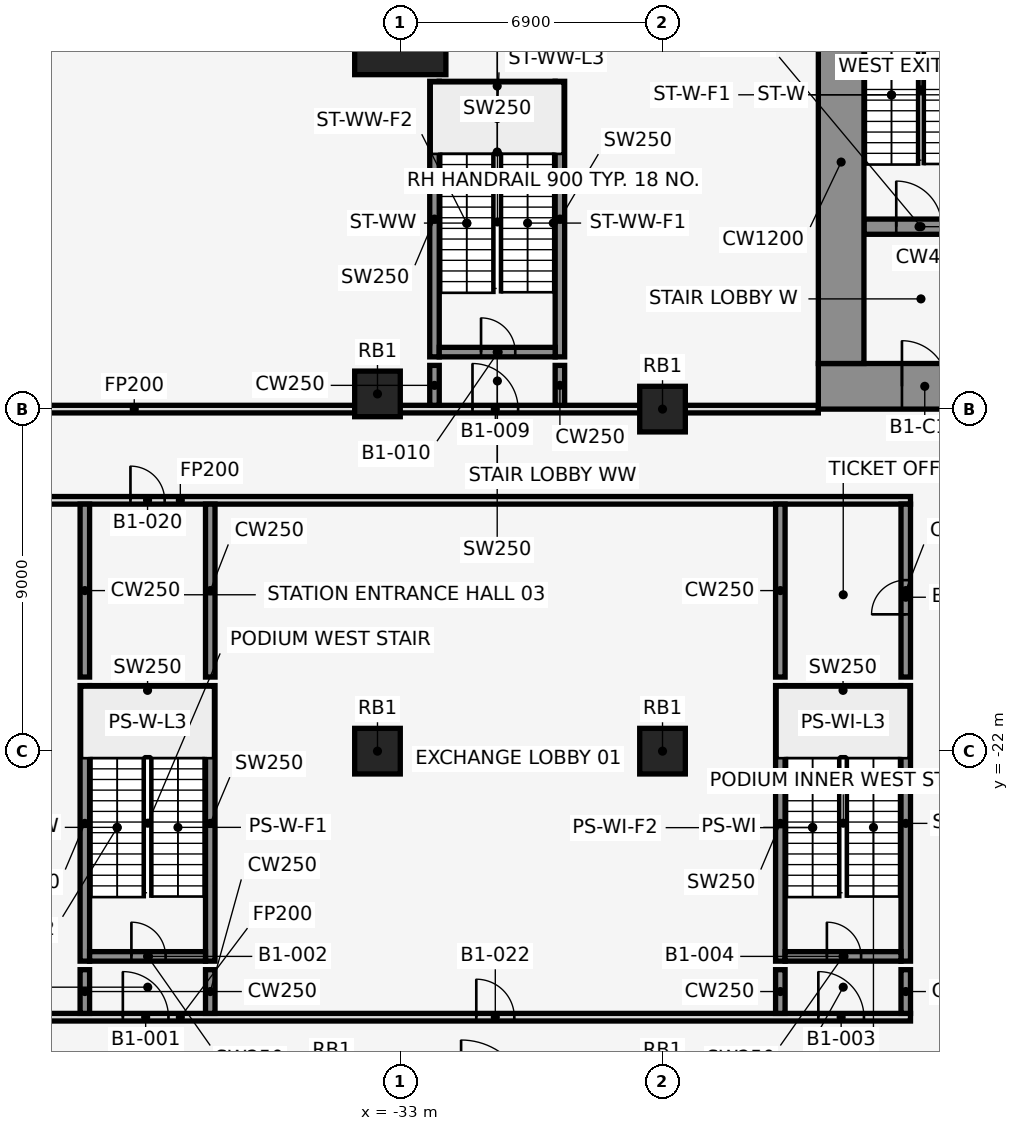
"""IFC4 building model, lengths in metres.
Left out: names, types, materials, properties, quantities, classifications, styles, units other than length and angle.
Written with IfcOpenShell. Run it as: python <this file> out.ifc"""

import sys

from ifc_helpers import new_model, si_unit, direction, frame, frame_2d, origin, origin_2d, place, context, subcontext, project, spatial, rectangle, extrude, element, fill, save


model = new_model("IFC4")
c1 = context("Model", 3, precision=1e-05, world=origin(), true_north=direction((0.0, 1.0)))
c2 = subcontext(c1, "Body", "Model", "MODEL_VIEW")
j1 = project(units=[si_unit("LENGTHUNIT", "METRE"), si_unit("PLANEANGLEUNIT", "RADIAN")], contexts=[c1])
p1 = place(None, origin())
s1 = spatial("IfcSite", under=j1, at=p1, CompositionType="ELEMENT")
p2 = place(p1, origin())
s2 = spatial("IfcBuilding", under=s1, at=p2, CompositionType="ELEMENT")
p3 = place(p2, frame((0.0, 0.0, -5.0)))
s3 = spatial("IfcBuildingStorey", under=s2, at=p3, CompositionType="ELEMENT", Elevation=-5.0)
p4 = place(p3, frame((-33.0, -3.0, 0.0), z_axis=(0.0, 0.0, 1.0), x_axis=(1.0, 0.0, 0.0)))
e1 = element("IfcColumn", 1, at=p4, inside=s3, PredefinedType="COLUMN", context=c2, shape_type="SweptSolid", body=[
    extrude(rectangle(XDim=2.4, YDim=2.4, at=origin_2d()), origin(), (0.0, 0.0, 1.0), 5.0),
])
for number, where, z_axis, x_axis in (
    (2, (-33.6, -12.6, 0.0), (0.0, 0.0, 1.0), (1.0, 0.0, 0.0)),
    (3, (-33.6, -22.0, 0.0), (0.0, 0.0, 1.0), (1.0, 0.0, 0.0)),
    (4, (-26.1, -22.0, 0.0), (0.0, 0.0, 1.0), (1.0, 0.0, 0.0)),
    (5, (-26.1, -13.0, 0.0), (0.0, 0.0, 1.0), (1.0, 0.0, 0.0)),
):
    element("IfcColumn", number, at=place(p3, frame(where, z_axis=z_axis, x_axis=x_axis)), inside=s3, PredefinedType="COLUMN", context=c2, shape_type="SweptSolid", body=[
        extrude(rectangle(XDim=1.2, YDim=1.2, at=origin_2d()), origin(), (0.0, 0.0, 1.0), 5.0),
    ])
for number, where, z_axis, x_axis in (
    (6, (-32.1, -11.625, 0.0), (0.0, 0.0, 1.0), (0.0, 1.0, 0.0)),
    (7, (-28.8, -11.625, 0.0), (0.0, 0.0, 1.0), (0.0, 1.0, 0.0)),
):
    element("IfcWall", number, at=place(p3, frame(where, z_axis=z_axis, x_axis=x_axis)), inside=s3, PredefinedType="SHEAR", context=c2, shape_type="SweptSolid", body=[
        extrude(rectangle(XDim=7.25, YDim=0.25, at=frame_2d((3.625, 0.0))), origin(), (0.0, 0.0, 1.0), 5.0),
    ])
p5 = place(p3, frame((-31.975, -11.5, 0.0), z_axis=(0.0, 0.0, 1.0), x_axis=(1.0, 0.0, 0.0)))
e8 = element("IfcWall", 8, at=p5, inside=s3, PredefinedType="SHEAR", context=c2, shape_type="SweptSolid", body=[
    extrude(rectangle(XDim=3.05, YDim=0.25, at=frame_2d((1.525, 0.0))), origin(), (0.0, 0.0, 1.0), 5.0),
])
p6 = place(p5, frame((1.1, 0.0, 0.0)))
e9 = element("IfcOpeningElement", 9, at=p6, cuts=e8, PredefinedType="OPENING", context=c2, shape_type="SweptSolid", body=[
    extrude(rectangle(XDim=0.9, YDim=2.1, at=frame_2d((0.45, 1.05))), frame((0.0, 0.137, 0.0), z_axis=(0.0, -1.0, 0.0), x_axis=(1.0, 0.0, 0.0)), (0.0, 0.0, 1.0), 0.274),
])
p7 = place(p3, frame((-31.975, -4.5, 0.0), z_axis=(0.0, 0.0, 1.0), x_axis=(1.0, 0.0, 0.0)))
e10 = element("IfcWall", 10, at=p7, inside=s3, PredefinedType="SHEAR", context=c2, shape_type="SweptSolid", body=[
    extrude(rectangle(XDim=3.05, YDim=0.25, at=frame_2d((1.525, 0.0))), origin(), (0.0, 0.0, 1.0), 5.0),
])
for number, where, z_axis, x_axis in (
    (11, (-41.3, -27.525, 0.0), (0.0, 0.0, 1.0), (0.0, 1.0, 0.0)),
    (12, (-38.0, -27.525, 0.0), (0.0, 0.0, 1.0), (0.0, 1.0, 0.0)),
):
    element("IfcWall", number, at=place(p3, frame(where, z_axis=z_axis, x_axis=x_axis)), inside=s3, PredefinedType="SHEAR", context=c2, shape_type="SweptSolid", body=[
        extrude(rectangle(XDim=7.25, YDim=0.25, at=frame_2d((3.625, 0.0))), origin(), (0.0, 0.0, 1.0), 5.0),
    ])
p8 = place(p3, frame((-41.175, -27.4, 0.0), z_axis=(0.0, 0.0, 1.0), x_axis=(1.0, 0.0, 0.0)))
e13 = element("IfcWall", 13, at=p8, inside=s3, PredefinedType="SHEAR", context=c2, shape_type="SweptSolid", body=[
    extrude(rectangle(XDim=3.05, YDim=0.25, at=frame_2d((1.525, 0.0))), origin(), (0.0, 0.0, 1.0), 5.0),
])
p9 = place(p8, frame((1.1, 0.0, 0.0)))
e14 = element("IfcOpeningElement", 14, at=p9, cuts=e13, PredefinedType="OPENING", context=c2, shape_type="SweptSolid", body=[
    extrude(rectangle(XDim=0.9, YDim=2.1, at=frame_2d((0.45, 1.05))), frame((0.0, 0.137, 0.0), z_axis=(0.0, -1.0, 0.0), x_axis=(1.0, 0.0, 0.0)), (0.0, 0.0, 1.0), 0.274),
])
p10 = place(p3, frame((-41.175, -20.4, 0.0), z_axis=(0.0, 0.0, 1.0), x_axis=(1.0, 0.0, 0.0)))
e15 = element("IfcWall", 15, at=p10, inside=s3, PredefinedType="SHEAR", context=c2, shape_type="SweptSolid", body=[
    extrude(rectangle(XDim=3.05, YDim=0.25, at=frame_2d((1.525, 0.0))), origin(), (0.0, 0.0, 1.0), 5.0),
])
for number, where, z_axis, x_axis in (
    (16, (-23.0, -27.525, 0.0), (0.0, 0.0, 1.0), (0.0, 1.0, 0.0)),
    (17, (-19.7, -27.525, 0.0), (0.0, 0.0, 1.0), (0.0, 1.0, 0.0)),
):
    element("IfcWall", number, at=place(p3, frame(where, z_axis=z_axis, x_axis=x_axis)), inside=s3, PredefinedType="SHEAR", context=c2, shape_type="SweptSolid", body=[
        extrude(rectangle(XDim=7.25, YDim=0.25, at=frame_2d((3.625, 0.0))), origin(), (0.0, 0.0, 1.0), 5.0),
    ])
p11 = place(p3, frame((-22.875, -27.4, 0.0), z_axis=(0.0, 0.0, 1.0), x_axis=(1.0, 0.0, 0.0)))
e18 = element("IfcWall", 18, at=p11, inside=s3, PredefinedType="SHEAR", context=c2, shape_type="SweptSolid", body=[
    extrude(rectangle(XDim=3.05, YDim=0.25, at=frame_2d((1.525, 0.0))), origin(), (0.0, 0.0, 1.0), 5.0),
])
p12 = place(p11, frame((1.1, 0.0, 0.0)))
e19 = element("IfcOpeningElement", 19, at=p12, cuts=e18, PredefinedType="OPENING", context=c2, shape_type="SweptSolid", body=[
    extrude(rectangle(XDim=0.9, YDim=2.1, at=frame_2d((0.45, 1.05))), frame((0.0, 0.137, 0.0), z_axis=(0.0, -1.0, 0.0), x_axis=(1.0, 0.0, 0.0)), (0.0, 0.0, 1.0), 0.274),
])
p13 = place(p3, frame((-22.875, -20.4, 0.0), z_axis=(0.0, 0.0, 1.0), x_axis=(1.0, 0.0, 0.0)))
e20 = element("IfcWall", 20, at=p13, inside=s3, PredefinedType="SHEAR", context=c2, shape_type="SweptSolid", body=[
    extrude(rectangle(XDim=3.05, YDim=0.25, at=frame_2d((1.525, 0.0))), origin(), (0.0, 0.0, 1.0), 5.0),
])
p14 = place(p3, frame((-58.0, -29.0, 0.0), z_axis=(0.0, 0.0, 1.0), x_axis=(1.0, 0.0, 0.0)))
e21 = element("IfcWall", 21, at=p14, inside=s3, PredefinedType="PARTITIONING", context=c2, shape_type="SweptSolid", body=[
    extrude(rectangle(XDim=38.425, YDim=0.2, at=frame_2d((19.212, 0.0))), origin(), (0.0, 0.0, 1.0), 4.7),
])
p15 = place(p14, frame((17.7, 0.0, 0.0)))
e22 = element("IfcOpeningElement", 22, at=p15, cuts=e21, PredefinedType="OPENING", context=c2, shape_type="SweptSolid", body=[
    extrude(rectangle(XDim=1.2, YDim=2.1, at=frame_2d((0.6, 1.05))), frame((0.0, 0.112, 0.0), z_axis=(0.0, -1.0, 0.0), x_axis=(1.0, 0.0, 0.0)), (0.0, 0.0, 1.0), 0.224),
])
p16 = place(p14, frame((36.0, 0.0, 0.0)))
e23 = element("IfcOpeningElement", 23, at=p16, cuts=e21, PredefinedType="OPENING", context=c2, shape_type="SweptSolid", body=[
    extrude(rectangle(XDim=1.2, YDim=2.1, at=frame_2d((0.6, 1.05))), frame((0.0, 0.112, 0.0), z_axis=(0.0, -1.0, 0.0), x_axis=(1.0, 0.0, 0.0)), (0.0, 0.0, 1.0), 0.224),
])
p17 = place(p14, frame((7.4, 0.0, 0.0)))
e24 = element("IfcOpeningElement", 24, at=p17, cuts=e21, PredefinedType="OPENING", context=c2, shape_type="SweptSolid", body=[
    extrude(rectangle(XDim=1.8, YDim=2.1, at=frame_2d((0.9, 1.05))), frame((0.0, 0.112, 0.0), z_axis=(0.0, -1.0, 0.0), x_axis=(1.0, 0.0, 0.0)), (0.0, 0.0, 1.0), 0.224),
])
p18 = place(p14, frame((27.0, 0.0, 0.0)))
e25 = element("IfcOpeningElement", 25, at=p18, cuts=e21, PredefinedType="OPENING", context=c2, shape_type="SweptSolid", body=[
    extrude(rectangle(XDim=1.0, YDim=2.1, at=frame_2d((0.5, 1.05))), frame((0.0, 0.112, 0.0), z_axis=(0.0, -1.0, 0.0), x_axis=(1.0, 0.0, 0.0)), (0.0, 0.0, 1.0), 0.224),
])
p19 = place(p3, frame((-58.0, -15.4, 0.0), z_axis=(0.0, 0.0, 1.0), x_axis=(1.0, 0.0, 0.0)))
e26 = element("IfcWall", 26, at=p19, inside=s3, PredefinedType="PARTITIONING", context=c2, shape_type="SweptSolid", body=[
    extrude(rectangle(XDim=38.425, YDim=0.2, at=frame_2d((19.212, 0.0))), origin(), (0.0, 0.0, 1.0), 4.7),
])
p20 = place(p19, frame((17.9, 0.0, 0.0)))
e27 = element("IfcOpeningElement", 27, at=p20, cuts=e26, PredefinedType="OPENING", context=c2, shape_type="SweptSolid", body=[
    extrude(rectangle(XDim=0.9, YDim=2.1, at=frame_2d((0.45, 1.05))), frame((0.0, 0.112, 0.0), z_axis=(0.0, -1.0, 0.0), x_axis=(1.0, 0.0, 0.0)), (0.0, 0.0, 1.0), 0.224),
])
p21 = place(p3, frame((-58.0, -13.0, 0.0), z_axis=(0.0, 0.0, 1.0), x_axis=(1.0, 0.0, 0.0)))
e28 = element("IfcWall", 28, at=p21, inside=s3, PredefinedType="PARTITIONING", context=c2, shape_type="SweptSolid", body=[
    extrude(rectangle(XDim=36.0, YDim=0.2, at=frame_2d((18.0, 0.0))), origin(), (0.0, 0.0, 1.0), 4.7),
])
p22 = place(p21, frame((26.9, 0.0, 0.0)))
e29 = element("IfcOpeningElement", 29, at=p22, cuts=e28, PredefinedType="OPENING", context=c2, shape_type="SweptSolid", body=[
    extrude(rectangle(XDim=1.2, YDim=2.1, at=frame_2d((0.6, 1.05))), frame((0.0, 0.112, 0.0), z_axis=(0.0, -1.0, 0.0), x_axis=(1.0, 0.0, 0.0)), (0.0, 0.0, 1.0), 0.224),
])
p23 = place(p21, frame((12.2, 0.0, 0.0)))
e30 = element("IfcOpeningElement", 30, at=p23, cuts=e28, PredefinedType="OPENING", context=c2, shape_type="SweptSolid", body=[
    extrude(rectangle(XDim=1.0, YDim=2.1, at=frame_2d((0.5, 1.05))), frame((0.0, 0.112, 0.0), z_axis=(0.0, -1.0, 0.0), x_axis=(1.0, 0.0, 0.0)), (0.0, 0.0, 1.0), 0.224),
])
p24 = place(p3, frame((-41.3, -28.9, 0.0), z_axis=(0.0, 0.0, 1.0), x_axis=(0.0, 1.0, 0.0)))
e31 = element("IfcWall", 31, at=p24, inside=s3, PredefinedType="SHEAR", context=c2, shape_type="SweptSolid", body=[
    extrude(rectangle(XDim=1.15, YDim=0.25, at=frame_2d((0.575, 0.0))), origin(), (0.0, 0.0, 1.0), 5.0),
])
p25 = place(p3, frame((-41.3, -20.05, 0.0), z_axis=(0.0, 0.0, 1.0), x_axis=(0.0, 1.0, 0.0)))
e32 = element("IfcWall", 32, at=p25, inside=s3, PredefinedType="SHEAR", context=c2, shape_type="SweptSolid", body=[
    extrude(rectangle(XDim=4.55, YDim=0.25, at=frame_2d((2.275, 0.0))), origin(), (0.0, 0.0, 1.0), 5.0),
])
p26 = place(p3, frame((-38.0, -28.9, 0.0), z_axis=(0.0, 0.0, 1.0), x_axis=(0.0, 1.0, 0.0)))
e33 = element("IfcWall", 33, at=p26, inside=s3, PredefinedType="SHEAR", context=c2, shape_type="SweptSolid", body=[
    extrude(rectangle(XDim=1.15, YDim=0.25, at=frame_2d((0.575, 0.0))), origin(), (0.0, 0.0, 1.0), 5.0),
])
p27 = place(p3, frame((-38.0, -20.05, 0.0), z_axis=(0.0, 0.0, 1.0), x_axis=(0.0, 1.0, 0.0)))
e34 = element("IfcWall", 34, at=p27, inside=s3, PredefinedType="SHEAR", context=c2, shape_type="SweptSolid", body=[
    extrude(rectangle(XDim=4.55, YDim=0.25, at=frame_2d((2.275, 0.0))), origin(), (0.0, 0.0, 1.0), 5.0),
])
for number, where, z_axis, x_axis in (
    (35, (-32.1, -12.9, 0.0), (0.0, 0.0, 1.0), (0.0, 1.0, 0.0)),
    (36, (-28.8, -12.9, 0.0), (0.0, 0.0, 1.0), (0.0, 1.0, 0.0)),
):
    element("IfcWall", number, at=place(p3, frame(where, z_axis=z_axis, x_axis=x_axis)), inside=s3, PredefinedType="SHEAR", context=c2, shape_type="SweptSolid", body=[
        extrude(rectangle(XDim=1.05, YDim=0.25, at=frame_2d((0.525, 0.0))), origin(), (0.0, 0.0, 1.0), 5.0),
    ])
p28 = place(p3, frame((-23.0, -28.9, 0.0), z_axis=(0.0, 0.0, 1.0), x_axis=(0.0, 1.0, 0.0)))
e37 = element("IfcWall", 37, at=p28, inside=s3, PredefinedType="SHEAR", context=c2, shape_type="SweptSolid", body=[
    extrude(rectangle(XDim=1.15, YDim=0.25, at=frame_2d((0.575, 0.0))), origin(), (0.0, 0.0, 1.0), 5.0),
])
p29 = place(p3, frame((-23.0, -20.05, 0.0), z_axis=(0.0, 0.0, 1.0), x_axis=(0.0, 1.0, 0.0)))
e38 = element("IfcWall", 38, at=p29, inside=s3, PredefinedType="SHEAR", context=c2, shape_type="SweptSolid", body=[
    extrude(rectangle(XDim=4.55, YDim=0.25, at=frame_2d((2.275, 0.0))), origin(), (0.0, 0.0, 1.0), 5.0),
])
p30 = place(p3, frame((-19.7, -28.9, 0.0), z_axis=(0.0, 0.0, 1.0), x_axis=(0.0, 1.0, 0.0)))
e39 = element("IfcWall", 39, at=p30, inside=s3, PredefinedType="SHEAR", context=c2, shape_type="SweptSolid", body=[
    extrude(rectangle(XDim=1.15, YDim=0.25, at=frame_2d((0.575, 0.0))), origin(), (0.0, 0.0, 1.0), 5.0),
])
p31 = place(p3, frame((-19.7, -20.05, 0.0), z_axis=(0.0, 0.0, 1.0), x_axis=(0.0, 1.0, 0.0)))
e40 = element("IfcWall", 40, at=p31, inside=s3, PredefinedType="SHEAR", context=c2, shape_type="SweptSolid", body=[
    extrude(rectangle(XDim=4.55, YDim=0.25, at=frame_2d((2.275, 0.0))), origin(), (0.0, 0.0, 1.0), 5.0),
])
p32 = place(p31, frame((1.65, 0.0, 0.0)))
e41 = element("IfcOpeningElement", 41, at=p32, cuts=e40, PredefinedType="OPENING", context=c2, shape_type="SweptSolid", body=[
    extrude(rectangle(XDim=0.9, YDim=2.1, at=frame_2d((0.45, 1.05))), frame((0.0, 0.137, 0.0), z_axis=(0.0, -1.0, 0.0), x_axis=(1.0, 0.0, 0.0)), (0.0, 0.0, 1.0), 0.274),
])
p33 = place(p3, frame((-20.8, -8.2, 0.0), z_axis=(0.0, 0.0, 1.0), x_axis=(1.0, 0.0, 0.0)))
e42 = element("IfcWall", 42, at=p33, inside=s3, PredefinedType="SHEAR", context=c2, shape_type="SweptSolid", body=[
    extrude(rectangle(XDim=3.0, YDim=0.4, at=frame_2d((1.5, 0.0))), origin(), (0.0, 0.0, 1.0), 5.0),
])
p34 = place(p33, frame((0.85, 0.0, 0.0)))
e43 = element("IfcOpeningElement", 43, at=p34, cuts=e42, PredefinedType="OPENING", context=c2, shape_type="SweptSolid", body=[
    extrude(rectangle(XDim=1.2, YDim=2.1, at=frame_2d((0.6, 1.05))), frame((0.0, 0.212, 0.0), z_axis=(0.0, -1.0, 0.0), x_axis=(1.0, 0.0, 0.0)), (0.0, 0.0, 1.0), 0.424),
])
p35 = place(p3, frame((-22.0, -12.4, 0.0), z_axis=(0.0, 0.0, 1.0), x_axis=(1.0, 0.0, 0.0)))
e44 = element("IfcWall", 44, at=p35, inside=s3, PredefinedType="SHEAR", context=c2, shape_type="SweptSolid", body=[
    extrude(rectangle(XDim=44.0, YDim=1.2, at=frame_2d((22.0, 0.0))), origin(), (0.0, 0.0, 1.0), 5.0),
])
p36 = place(p35, frame((2.2, 0.0, 0.0)))
e45 = element("IfcOpeningElement", 45, at=p36, cuts=e44, PredefinedType="OPENING", context=c2, shape_type="SweptSolid", body=[
    extrude(rectangle(XDim=1.2, YDim=2.1, at=frame_2d((0.6, 1.05))), frame((0.0, 0.612, 0.0), z_axis=(0.0, -1.0, 0.0), x_axis=(1.0, 0.0, 0.0)), (0.0, 0.0, 1.0), 1.224),
])
p37 = place(p35, frame((21.4, 0.0, 0.0)))
e46 = element("IfcOpeningElement", 46, at=p37, cuts=e44, PredefinedType="OPENING", context=c2, shape_type="SweptSolid", body=[
    extrude(rectangle(XDim=1.2, YDim=2.1, at=frame_2d((0.6, 1.05))), frame((0.0, 0.612, 0.0), z_axis=(0.0, -1.0, 0.0), x_axis=(1.0, 0.0, 0.0)), (0.0, 0.0, 1.0), 1.224),
])
p38 = place(p35, frame((40.6, 0.0, 0.0)))
e47 = element("IfcOpeningElement", 47, at=p38, cuts=e44, PredefinedType="OPENING", context=c2, shape_type="SweptSolid", body=[
    extrude(rectangle(XDim=1.2, YDim=2.1, at=frame_2d((0.6, 1.05))), frame((0.0, 0.612, 0.0), z_axis=(0.0, -1.0, 0.0), x_axis=(1.0, 0.0, 0.0)), (0.0, 0.0, 1.0), 1.224),
])
p39 = place(p35, frame((16.0, 0.0, 0.0)))
e48 = element("IfcOpeningElement", 48, at=p39, cuts=e44, PredefinedType="OPENING", context=c2, shape_type="SweptSolid", body=[
    extrude(rectangle(XDim=1.8, YDim=2.1, at=frame_2d((0.9, 1.05))), frame((0.0, 0.612, 0.0), z_axis=(0.0, -1.0, 0.0), x_axis=(1.0, 0.0, 0.0)), (0.0, 0.0, 1.0), 1.224),
])
p40 = place(p35, frame((6.3, 0.0, 0.0)))
e49 = element("IfcOpeningElement", 49, at=p40, cuts=e44, PredefinedType="OPENING", context=c2, shape_type="SweptSolid", body=[
    extrude(rectangle(XDim=1.2, YDim=2.1, at=frame_2d((0.6, 1.05))), frame((0.0, 0.612, 0.0), z_axis=(0.0, -1.0, 0.0), x_axis=(1.0, 0.0, 0.0)), (0.0, 0.0, 1.0), 1.224),
])
p41 = place(p35, frame((26.2, 0.0, 0.0)))
e50 = element("IfcOpeningElement", 50, at=p41, cuts=e44, PredefinedType="OPENING", context=c2, shape_type="SweptSolid", body=[
    extrude(rectangle(XDim=1.8, YDim=2.1, at=frame_2d((0.9, 1.05))), frame((0.0, 0.612, 0.0), z_axis=(0.0, -1.0, 0.0), x_axis=(1.0, 0.0, 0.0)), (0.0, 0.0, 1.0), 1.224),
])
p42 = place(p35, frame((36.5, 0.0, 0.0)))
e51 = element("IfcOpeningElement", 51, at=p42, cuts=e44, PredefinedType="OPENING", context=c2, shape_type="SweptSolid", body=[
    extrude(rectangle(XDim=1.2, YDim=2.1, at=frame_2d((0.6, 1.05))), frame((0.0, 0.612, 0.0), z_axis=(0.0, -1.0, 0.0), x_axis=(1.0, 0.0, 0.0)), (0.0, 0.0, 1.0), 1.224),
])
p43 = place(p3, frame((-21.4, -11.8, 0.0), z_axis=(0.0, 0.0, 1.0), x_axis=(0.0, 1.0, 0.0)))
e52 = element("IfcWall", 52, at=p43, inside=s3, PredefinedType="SHEAR", context=c2, shape_type="SweptSolid", body=[
    extrude(rectangle(XDim=10.6, YDim=1.2, at=frame_2d((5.3, 0.0))), origin(), (0.0, 0.0, 1.0), 5.0),
])
p44 = place(p15, origin())
e53 = element("IfcDoor", 53, at=p44, inside=s3, OperationType="SINGLE_SWING_LEFT", PredefinedType="DOOR", context=c2, shape_type="SweptSolid", body=[
    extrude(rectangle(XDim=1.2, YDim=2.1, at=frame_2d((0.6, 1.05))), frame((0.0, 0.025, 0.0), z_axis=(0.0, -1.0, 0.0), x_axis=(1.0, 0.0, 0.0)), (0.0, 0.0, 1.0), 0.05),
])
fill(e22, e53)
p45 = place(p9, origin())
e54 = element("IfcDoor", 54, at=p45, inside=s3, OperationType="SINGLE_SWING_LEFT", PredefinedType="DOOR", context=c2, shape_type="SweptSolid", body=[
    extrude(rectangle(XDim=0.9, YDim=2.1, at=frame_2d((0.45, 1.05))), frame((0.0, 0.025, 0.0), z_axis=(0.0, -1.0, 0.0), x_axis=(1.0, 0.0, 0.0)), (0.0, 0.0, 1.0), 0.05),
])
fill(e14, e54)
p46 = place(p16, origin())
e55 = element("IfcDoor", 55, at=p46, inside=s3, OperationType="SINGLE_SWING_RIGHT", PredefinedType="DOOR", context=c2, shape_type="SweptSolid", body=[
    extrude(rectangle(XDim=1.2, YDim=2.1, at=frame_2d((0.6, 1.05))), frame((0.0, 0.025, 0.0), z_axis=(0.0, -1.0, 0.0), x_axis=(1.0, 0.0, 0.0)), (0.0, 0.0, 1.0), 0.05),
])
fill(e23, e55)
p47 = place(p12, origin())
e56 = element("IfcDoor", 56, at=p47, inside=s3, OperationType="SINGLE_SWING_LEFT", PredefinedType="DOOR", context=c2, shape_type="SweptSolid", body=[
    extrude(rectangle(XDim=0.9, YDim=2.1, at=frame_2d((0.45, 1.05))), frame((0.0, 0.025, 0.0), z_axis=(0.0, -1.0, 0.0), x_axis=(1.0, 0.0, 0.0)), (0.0, 0.0, 1.0), 0.05),
])
fill(e19, e56)
p48 = place(p22, origin())
e57 = element("IfcDoor", 57, at=p48, inside=s3, OperationType="SINGLE_SWING_RIGHT", PredefinedType="DOOR", context=c2, shape_type="SweptSolid", body=[
    extrude(rectangle(XDim=1.2, YDim=2.1, at=frame_2d((0.6, 1.05))), frame((0.0, 0.025, 0.0), z_axis=(0.0, -1.0, 0.0), x_axis=(1.0, 0.0, 0.0)), (0.0, 0.0, 1.0), 0.05),
])
fill(e29, e57)
p49 = place(p6, origin())
e58 = element("IfcDoor", 58, at=p49, inside=s3, OperationType="SINGLE_SWING_LEFT", PredefinedType="DOOR", context=c2, shape_type="SweptSolid", body=[
    extrude(rectangle(XDim=0.9, YDim=2.1, at=frame_2d((0.45, 1.05))), frame((0.0, 0.025, 0.0), z_axis=(0.0, -1.0, 0.0), x_axis=(1.0, 0.0, 0.0)), (0.0, 0.0, 1.0), 0.05),
])
fill(e9, e58)
p50 = place(p20, frame((0.9, 0.0, 0.0), z_axis=(0.0, 0.0, 1.0), x_axis=(-1.0, 0.0, 0.0)))
e59 = element("IfcDoor", 59, at=p50, inside=s3, OperationType="SINGLE_SWING_RIGHT", PredefinedType="DOOR", context=c2, shape_type="SweptSolid", body=[
    extrude(rectangle(XDim=0.9, YDim=2.1, at=frame_2d((0.45, 1.05))), frame((0.0, 0.025, 0.0), z_axis=(0.0, -1.0, 0.0), x_axis=(1.0, 0.0, 0.0)), (0.0, 0.0, 1.0), 0.05),
])
fill(e27, e59)
p51 = place(p18, origin())
e60 = element("IfcDoor", 60, at=p51, inside=s3, OperationType="SINGLE_SWING_LEFT", PredefinedType="DOOR", context=c2, shape_type="SweptSolid", body=[
    extrude(rectangle(XDim=1.0, YDim=2.1, at=frame_2d((0.5, 1.05))), frame((0.0, 0.025, 0.0), z_axis=(0.0, -1.0, 0.0), x_axis=(1.0, 0.0, 0.0)), (0.0, 0.0, 1.0), 0.05),
])
fill(e25, e60)
p52 = place(p32, origin())
e61 = element("IfcDoor", 61, at=p52, inside=s3, OperationType="SINGLE_SWING_RIGHT", PredefinedType="DOOR", context=c2, shape_type="SweptSolid", body=[
    extrude(rectangle(XDim=0.9, YDim=2.1, at=frame_2d((0.45, 1.05))), frame((0.0, 0.025, 0.0), z_axis=(0.0, -1.0, 0.0), x_axis=(1.0, 0.0, 0.0)), (0.0, 0.0, 1.0), 0.05),
])
fill(e41, e61)
p53 = place(p34, origin())
e62 = element("IfcDoor", 62, at=p53, inside=s3, OperationType="SINGLE_SWING_LEFT", PredefinedType="DOOR", context=c2, shape_type="SweptSolid", body=[
    extrude(rectangle(XDim=1.2, YDim=2.1, at=frame_2d((0.6, 1.05))), frame((0.0, 0.025, 0.0), z_axis=(0.0, -1.0, 0.0), x_axis=(1.0, 0.0, 0.0)), (0.0, 0.0, 1.0), 0.05),
])
fill(e43, e62)
p54 = place(p36, frame((1.2, 0.0, 0.0), z_axis=(0.0, 0.0, 1.0), x_axis=(-1.0, 0.0, 0.0)))
e63 = element("IfcDoor", 63, at=p54, inside=s3, OperationType="SINGLE_SWING_RIGHT", PredefinedType="DOOR", context=c2, shape_type="SweptSolid", body=[
    extrude(rectangle(XDim=1.2, YDim=2.1, at=frame_2d((0.6, 1.05))), frame((0.0, 0.025, 0.0), z_axis=(0.0, -1.0, 0.0), x_axis=(1.0, 0.0, 0.0)), (0.0, 0.0, 1.0), 0.05),
])
fill(e45, e63)
save(model, sys.argv[1])
